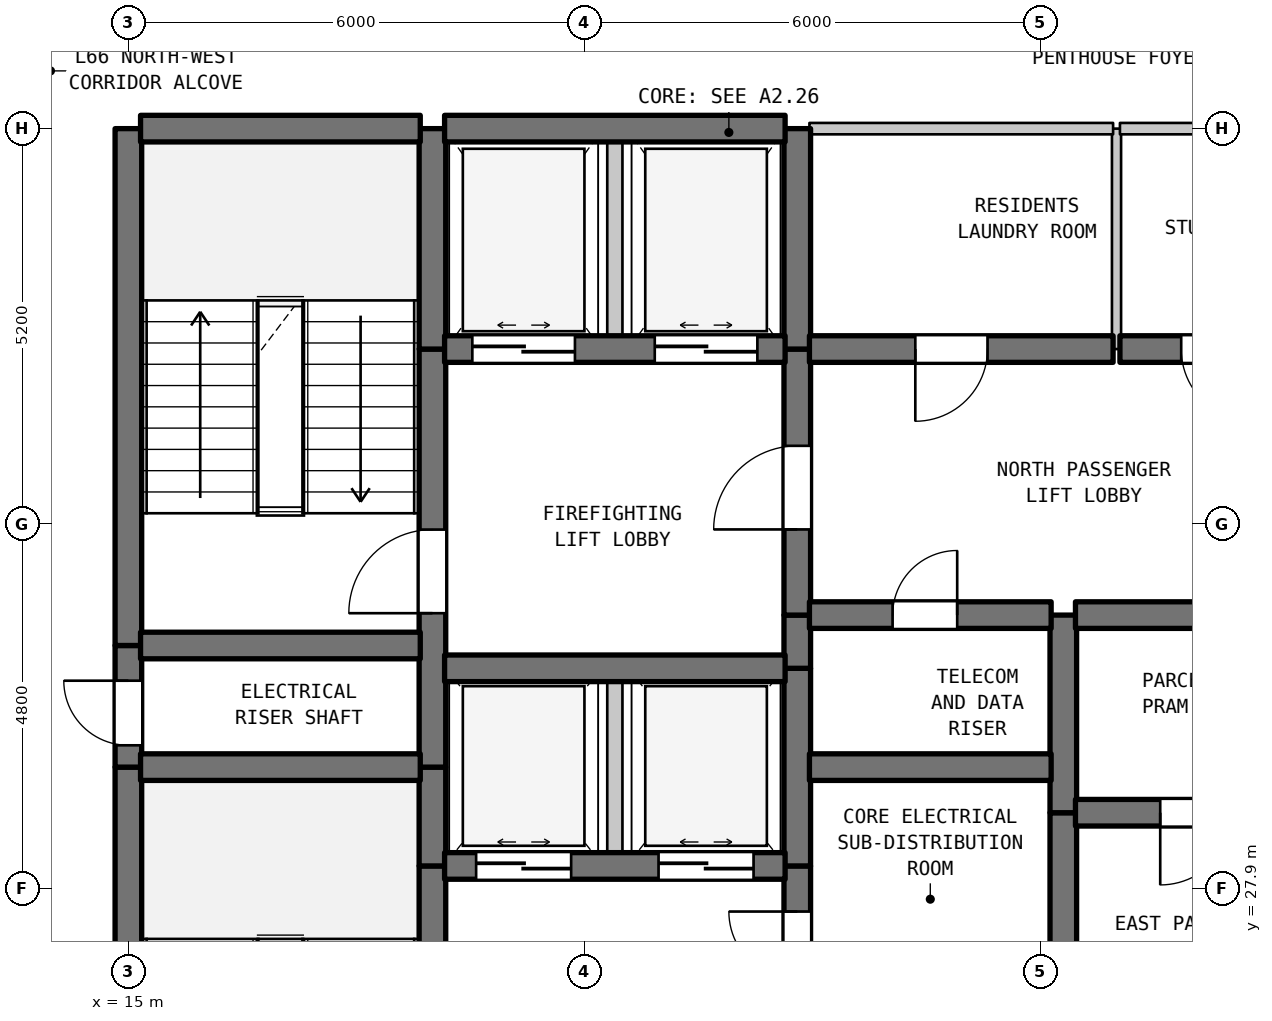
"""IFC4 building model, lengths in metres.
Left out: names, types, materials, properties, quantities, classifications, styles, units other than length and angle.
Written with IfcOpenShell. Run it as: python <this file> out.ifc"""

import sys

from ifc_helpers import new_model, si_unit, direction, frame, frame_2d, origin, place, context, subcontext, project, spatial, rectangle, extrude, element, fill, save


model = new_model("IFC4")
c1 = context("Model", 3, precision=1e-05, world=origin(), true_north=direction((0.0, 1.0)))
c2 = subcontext(c1, "Body", "Model", "MODEL_VIEW")
j1 = project(units=[si_unit("LENGTHUNIT", "METRE"), si_unit("PLANEANGLEUNIT", "RADIAN")], contexts=[c1])
p1 = place(None, origin())
s1 = spatial("IfcSite", under=j1, at=p1, CompositionType="ELEMENT")
p2 = place(p1, origin())
s2 = spatial("IfcBuilding", under=s1, at=p2, CompositionType="ELEMENT")
p3 = place(p2, frame((0.0, 0.0, 265.8)))
s3 = spatial("IfcBuildingStorey", under=s2, at=p3, CompositionType="ELEMENT", Elevation=265.8)
p4 = place(p3, frame((15.0, 22.7, 0.0), z_axis=(0.0, 0.0, 1.0), x_axis=(0.0, 1.0, 0.0)))
e1 = element("IfcWall", 1, at=p4, inside=s3, PredefinedType="SHEAR", context=c2, shape_type="SweptSolid", body=[
    extrude(rectangle(XDim=6.8, YDim=0.35, at=frame_2d((3.4, 0.0))), origin(), (0.0, 0.0, 1.0), 3.39),
])
p5 = place(p3, frame((15.0, 29.5, 0.0), z_axis=(0.0, 0.0, 1.0), x_axis=(0.0, 1.0, 0.0)))
e2 = element("IfcWall", 2, at=p5, inside=s3, PredefinedType="SHEAR", context=c2, shape_type="SweptSolid", body=[
    extrude(rectangle(XDim=1.6, YDim=0.35, at=frame_2d((0.8, 0.0))), origin(), (0.0, 0.0, 1.0), 3.39),
])
p6 = place(p5, frame((0.287, 0.0, 0.0)))
e3 = element("IfcOpeningElement", 3, at=p6, cuts=e2, PredefinedType="OPENING", context=c2, shape_type="SweptSolid", body=[
    extrude(rectangle(XDim=0.85, YDim=2.1, at=frame_2d((0.425, 1.05))), frame((0.0, 0.185, 0.0), z_axis=(0.0, -1.0, 0.0), x_axis=(1.0, 0.0, 0.0)), (0.0, 0.0, 1.0), 0.37),
])
p7 = place(p3, frame((15.0, 31.1, 0.0), z_axis=(0.0, 0.0, 1.0), x_axis=(0.0, 1.0, 0.0)))
e4 = element("IfcWall", 4, at=p7, inside=s3, PredefinedType="SHEAR", context=c2, shape_type="SweptSolid", body=[
    extrude(rectangle(XDim=6.8, YDim=0.35, at=frame_2d((3.4, 0.0))), origin(), (0.0, 0.0, 1.0), 3.39),
])
p8 = place(p3, frame((19.0, 22.7, 0.0), z_axis=(0.0, 0.0, 1.0), x_axis=(0.0, 1.0, 0.0)))
e5 = element("IfcWall", 5, at=p8, inside=s3, PredefinedType="SHEAR", context=c2, shape_type="SweptSolid", body=[
    extrude(rectangle(XDim=5.5, YDim=0.35, at=frame_2d((2.75, 0.0))), origin(), (0.0, 0.0, 1.0), 3.39),
])
p9 = place(p8, frame((0.631, 0.0, 0.0)))
e6 = element("IfcOpeningElement", 6, at=p9, cuts=e5, PredefinedType="OPENING", context=c2, shape_type="SweptSolid", body=[
    extrude(rectangle(XDim=1.1, YDim=2.15, at=frame_2d((0.55, 1.075))), frame((0.0, 0.185, 0.0), z_axis=(0.0, -1.0, 0.0), x_axis=(1.0, 0.0, 0.0)), (0.0, 0.0, 1.0), 0.37),
])
p10 = place(p3, frame((19.0, 28.2, 0.0), z_axis=(0.0, 0.0, 1.0), x_axis=(0.0, 1.0, 0.0)))
e7 = element("IfcWall", 7, at=p10, inside=s3, PredefinedType="SHEAR", context=c2, shape_type="SweptSolid", body=[
    extrude(rectangle(XDim=1.3, YDim=0.35, at=frame_2d((0.65, 0.0))), origin(), (0.0, 0.0, 1.0), 3.39),
])
p11 = place(p3, frame((19.0, 29.5, 0.0), z_axis=(0.0, 0.0, 1.0), x_axis=(0.0, 1.0, 0.0)))
e8 = element("IfcWall", 8, at=p11, inside=s3, PredefinedType="SHEAR", context=c2, shape_type="SweptSolid", body=[
    extrude(rectangle(XDim=5.5, YDim=0.35, at=frame_2d((2.75, 0.0))), origin(), (0.0, 0.0, 1.0), 3.39),
])
p12 = place(p11, frame((2.025, 0.0, 0.0)))
e9 = element("IfcOpeningElement", 9, at=p12, cuts=e8, PredefinedType="OPENING", context=c2, shape_type="SweptSolid", body=[
    extrude(rectangle(XDim=1.1, YDim=2.15, at=frame_2d((0.55, 1.075))), frame((0.0, 0.185, 0.0), z_axis=(0.0, -1.0, 0.0), x_axis=(1.0, 0.0, 0.0)), (0.0, 0.0, 1.0), 0.37),
])
p13 = place(p3, frame((19.0, 35.0, 0.0), z_axis=(0.0, 0.0, 1.0), x_axis=(0.0, 1.0, 0.0)))
e10 = element("IfcWall", 10, at=p13, inside=s3, PredefinedType="SHEAR", context=c2, shape_type="SweptSolid", body=[
    extrude(rectangle(XDim=2.9, YDim=0.35, at=frame_2d((1.45, 0.0))), origin(), (0.0, 0.0, 1.0), 3.39),
])
p14 = place(p3, frame((21.4, 28.2, 0.0), z_axis=(0.0, 0.0, 1.0), x_axis=(0.0, 1.0, 0.0)))
e11 = element("IfcWall", 11, at=p14, inside=s3, PredefinedType="STANDARD", context=c2, shape_type="SweptSolid", body=[
    extrude(rectangle(XDim=2.6, YDim=0.2, at=frame_2d((1.3, 0.0))), origin(), (0.0, 0.0, 1.0), 3.39),
])
p15 = place(p3, frame((21.4, 35.0, 0.0), z_axis=(0.0, 0.0, 1.0), x_axis=(0.0, 1.0, 0.0)))
e12 = element("IfcWall", 12, at=p15, inside=s3, PredefinedType="STANDARD", context=c2, shape_type="SweptSolid", body=[
    extrude(rectangle(XDim=2.9, YDim=0.2, at=frame_2d((1.45, 0.0))), origin(), (0.0, 0.0, 1.0), 3.39),
])
p16 = place(p3, frame((23.8, 26.1, 0.0), z_axis=(0.0, 0.0, 1.0), x_axis=(0.0, 1.0, 0.0)))
e13 = element("IfcWall", 13, at=p16, inside=s3, PredefinedType="SHEAR", context=c2, shape_type="SweptSolid", body=[
    extrude(rectangle(XDim=2.1, YDim=0.35, at=frame_2d((1.05, 0.0))), origin(), (0.0, 0.0, 1.0), 3.39),
])
p17 = place(p16, frame((0.6, 0.0, 0.0)))
e14 = element("IfcOpeningElement", 14, at=p17, cuts=e13, PredefinedType="OPENING", context=c2, shape_type="SweptSolid", body=[
    extrude(rectangle(XDim=0.9, YDim=2.15, at=frame_2d((0.45, 1.075))), frame((0.0, 0.185, 0.0), z_axis=(0.0, -1.0, 0.0), x_axis=(1.0, 0.0, 0.0)), (0.0, 0.0, 1.0), 0.37),
])
p18 = place(p3, frame((23.8, 28.2, 0.0), z_axis=(0.0, 0.0, 1.0), x_axis=(0.0, 1.0, 0.0)))
e15 = element("IfcWall", 15, at=p18, inside=s3, PredefinedType="SHEAR", context=c2, shape_type="SweptSolid", body=[
    extrude(rectangle(XDim=2.6, YDim=0.35, at=frame_2d((1.3, 0.0))), origin(), (0.0, 0.0, 1.0), 3.39),
])
p19 = place(p3, frame((23.8, 30.8, 0.0), z_axis=(0.0, 0.0, 1.0), x_axis=(0.0, 1.0, 0.0)))
e16 = element("IfcWall", 16, at=p19, inside=s3, PredefinedType="SHEAR", context=c2, shape_type="SweptSolid", body=[
    extrude(rectangle(XDim=0.7, YDim=0.35, at=frame_2d((0.35, 0.0))), origin(), (0.0, 0.0, 1.0), 3.39),
])
p20 = place(p3, frame((23.8, 31.5, 0.0), z_axis=(0.0, 0.0, 1.0), x_axis=(0.0, 1.0, 0.0)))
e17 = element("IfcWall", 17, at=p20, inside=s3, PredefinedType="SHEAR", context=c2, shape_type="SweptSolid", body=[
    extrude(rectangle(XDim=3.5, YDim=0.35, at=frame_2d((1.75, 0.0))), origin(), (0.0, 0.0, 1.0), 3.39),
])
p21 = place(p20, frame((1.127, 0.0, 0.0)))
e18 = element("IfcOpeningElement", 18, at=p21, cuts=e17, PredefinedType="OPENING", context=c2, shape_type="SweptSolid", body=[
    extrude(rectangle(XDim=1.1, YDim=2.15, at=frame_2d((0.55, 1.075))), frame((0.0, 0.185, 0.0), z_axis=(0.0, -1.0, 0.0), x_axis=(1.0, 0.0, 0.0)), (0.0, 0.0, 1.0), 0.37),
])
p22 = place(p3, frame((23.8, 35.0, 0.0), z_axis=(0.0, 0.0, 1.0), x_axis=(0.0, 1.0, 0.0)))
e19 = element("IfcWall", 19, at=p22, inside=s3, PredefinedType="SHEAR", context=c2, shape_type="SweptSolid", body=[
    extrude(rectangle(XDim=2.9, YDim=0.35, at=frame_2d((1.45, 0.0))), origin(), (0.0, 0.0, 1.0), 3.39),
])
p23 = place(p3, frame((27.3, 26.1, 0.0), z_axis=(0.0, 0.0, 1.0), x_axis=(0.0, 1.0, 0.0)))
e20 = element("IfcWall", 20, at=p23, inside=s3, PredefinedType="SHEAR", context=c2, shape_type="SweptSolid", body=[
    extrude(rectangle(XDim=2.8, YDim=0.35, at=frame_2d((1.4, 0.0))), origin(), (0.0, 0.0, 1.0), 3.39),
])
p24 = place(p3, frame((27.3, 28.9, 0.0), z_axis=(0.0, 0.0, 1.0), x_axis=(0.0, 1.0, 0.0)))
e21 = element("IfcWall", 21, at=p24, inside=s3, PredefinedType="SHEAR", context=c2, shape_type="SweptSolid", body=[
    extrude(rectangle(XDim=2.6, YDim=0.35, at=frame_2d((1.3, 0.0))), origin(), (0.0, 0.0, 1.0), 3.39),
])
p25 = place(p3, frame((28.0, 35.0, 0.0), z_axis=(0.0, 0.0, 1.0), x_axis=(0.0, 1.0, 0.0)))
e22 = element("IfcWall", 22, at=p25, inside=s3, PredefinedType="PARTITIONING", context=c2, shape_type="SweptSolid", body=[
    extrude(rectangle(XDim=2.9, YDim=0.12, at=frame_2d((1.45, 0.0))), origin(), (0.0, 0.0, 1.0), 3.39),
])
p26 = place(p3, frame((19.16, 28.2, 0.0), z_axis=(0.0, 0.0, 1.0), x_axis=(1.0, 0.0, 0.0)))
e23 = element("IfcWall", 23, at=p26, inside=s3, PredefinedType="SHEAR", context=c2, shape_type="SweptSolid", body=[
    extrude(rectangle(XDim=4.48, YDim=0.35, at=frame_2d((2.24, 0.0))), origin(), (0.0, 0.0, 1.0), 3.39),
])
p27 = place(p26, frame((0.415, 0.0, 0.0)))
e24 = element("IfcOpeningElement", 24, at=p27, cuts=e23, PredefinedType="OPENING", context=c2, shape_type="SweptSolid", body=[
    extrude(rectangle(XDim=1.25, YDim=2.2, at=frame_2d((0.625, 1.1))), frame((0.0, 0.185, 0.0), z_axis=(0.0, -1.0, 0.0), x_axis=(1.0, 0.0, 0.0)), (0.0, 0.0, 1.0), 0.37),
])
p28 = place(p26, frame((2.815, 0.0, 0.0)))
e25 = element("IfcOpeningElement", 25, at=p28, cuts=e23, PredefinedType="OPENING", context=c2, shape_type="SweptSolid", body=[
    extrude(rectangle(XDim=1.25, YDim=2.2, at=frame_2d((0.625, 1.1))), frame((0.0, 0.185, 0.0), z_axis=(0.0, -1.0, 0.0), x_axis=(1.0, 0.0, 0.0)), (0.0, 0.0, 1.0), 0.37),
])
p29 = place(p3, frame((27.46, 28.9, 0.0), z_axis=(0.0, 0.0, 1.0), x_axis=(1.0, 0.0, 0.0)))
e26 = element("IfcWall", 26, at=p29, inside=s3, PredefinedType="SHEAR", context=c2, shape_type="SweptSolid", body=[
    extrude(rectangle(XDim=3.18, YDim=0.35, at=frame_2d((1.59, 0.0))), origin(), (0.0, 0.0, 1.0), 3.39),
])
p30 = place(p29, frame((1.115, 0.0, 0.0)))
e27 = element("IfcOpeningElement", 27, at=p30, cuts=e26, PredefinedType="OPENING", context=c2, shape_type="SweptSolid", body=[
    extrude(rectangle(XDim=0.95, YDim=2.15, at=frame_2d((0.475, 1.075))), frame((0.0, 0.185, 0.0), z_axis=(0.0, -1.0, 0.0), x_axis=(1.0, 0.0, 0.0)), (0.0, 0.0, 1.0), 0.37),
])
p31 = place(p3, frame((15.16, 29.5, 0.0), z_axis=(0.0, 0.0, 1.0), x_axis=(1.0, 0.0, 0.0)))
e28 = element("IfcWall", 28, at=p31, inside=s3, PredefinedType="SHEAR", context=c2, shape_type="SweptSolid", body=[
    extrude(rectangle(XDim=3.68, YDim=0.35, at=frame_2d((1.84, 0.0))), origin(), (0.0, 0.0, 1.0), 3.39),
])
p32 = place(p3, frame((23.96, 29.5, 0.0), z_axis=(0.0, 0.0, 1.0), x_axis=(1.0, 0.0, 0.0)))
e29 = element("IfcWall", 29, at=p32, inside=s3, PredefinedType="SHEAR", context=c2, shape_type="SweptSolid", body=[
    extrude(rectangle(XDim=3.18, YDim=0.35, at=frame_2d((1.59, 0.0))), origin(), (0.0, 0.0, 1.0), 3.39),
])
p33 = place(p3, frame((19.16, 30.8, 0.0), z_axis=(0.0, 0.0, 1.0), x_axis=(1.0, 0.0, 0.0)))
e30 = element("IfcWall", 30, at=p33, inside=s3, PredefinedType="SHEAR", context=c2, shape_type="SweptSolid", body=[
    extrude(rectangle(XDim=4.48, YDim=0.35, at=frame_2d((2.24, 0.0))), origin(), (0.0, 0.0, 1.0), 3.39),
])
p34 = place(p3, frame((15.16, 31.1, 0.0), z_axis=(0.0, 0.0, 1.0), x_axis=(1.0, 0.0, 0.0)))
e31 = element("IfcWall", 31, at=p34, inside=s3, PredefinedType="SHEAR", context=c2, shape_type="SweptSolid", body=[
    extrude(rectangle(XDim=3.68, YDim=0.35, at=frame_2d((1.84, 0.0))), origin(), (0.0, 0.0, 1.0), 3.39),
])
p35 = place(p3, frame((23.96, 31.5, 0.0), z_axis=(0.0, 0.0, 1.0), x_axis=(1.0, 0.0, 0.0)))
e32 = element("IfcWall", 32, at=p35, inside=s3, PredefinedType="SHEAR", context=c2, shape_type="SweptSolid", body=[
    extrude(rectangle(XDim=3.18, YDim=0.35, at=frame_2d((1.59, 0.0))), origin(), (0.0, 0.0, 1.0), 3.39),
])
p36 = place(p35, frame((1.094, 0.0, 0.0)))
e33 = element("IfcOpeningElement", 33, at=p36, cuts=e32, PredefinedType="OPENING", context=c2, shape_type="SweptSolid", body=[
    extrude(rectangle(XDim=0.85, YDim=2.1, at=frame_2d((0.425, 1.05))), frame((0.0, 0.185, 0.0), z_axis=(0.0, -1.0, 0.0), x_axis=(1.0, 0.0, 0.0)), (0.0, 0.0, 1.0), 0.37),
])
p37 = place(p3, frame((27.46, 31.5, 0.0), z_axis=(0.0, 0.0, 1.0), x_axis=(1.0, 0.0, 0.0)))
e34 = element("IfcWall", 34, at=p37, inside=s3, PredefinedType="SHEAR", context=c2, shape_type="SweptSolid", body=[
    extrude(rectangle(XDim=3.18, YDim=0.35, at=frame_2d((1.59, 0.0))), origin(), (0.0, 0.0, 1.0), 3.39),
])
p38 = place(p3, frame((19.16, 35.0, 0.0), z_axis=(0.0, 0.0, 1.0), x_axis=(1.0, 0.0, 0.0)))
e35 = element("IfcWall", 35, at=p38, inside=s3, PredefinedType="SHEAR", context=c2, shape_type="SweptSolid", body=[
    extrude(rectangle(XDim=4.48, YDim=0.35, at=frame_2d((2.24, 0.0))), origin(), (0.0, 0.0, 1.0), 3.39),
])
p39 = place(p38, frame((0.365, 0.0, 0.0)))
e36 = element("IfcOpeningElement", 36, at=p39, cuts=e35, PredefinedType="OPENING", context=c2, shape_type="SweptSolid", body=[
    extrude(rectangle(XDim=1.35, YDim=2.2, at=frame_2d((0.675, 1.1))), frame((0.0, 0.185, 0.0), z_axis=(0.0, -1.0, 0.0), x_axis=(1.0, 0.0, 0.0)), (0.0, 0.0, 1.0), 0.37),
])
p40 = place(p38, frame((2.765, 0.0, 0.0)))
e37 = element("IfcOpeningElement", 37, at=p40, cuts=e35, PredefinedType="OPENING", context=c2, shape_type="SweptSolid", body=[
    extrude(rectangle(XDim=1.35, YDim=2.2, at=frame_2d((0.675, 1.1))), frame((0.0, 0.185, 0.0), z_axis=(0.0, -1.0, 0.0), x_axis=(1.0, 0.0, 0.0)), (0.0, 0.0, 1.0), 0.37),
])
p41 = place(p3, frame((23.96, 35.0, 0.0), z_axis=(0.0, 0.0, 1.0), x_axis=(1.0, 0.0, 0.0)))
e38 = element("IfcWall", 38, at=p41, inside=s3, PredefinedType="SHEAR", context=c2, shape_type="SweptSolid", body=[
    extrude(rectangle(XDim=3.995, YDim=0.35, at=frame_2d((1.998, 0.0))), origin(), (0.0, 0.0, 1.0), 3.39),
])
p42 = place(p41, frame((1.393, 0.0, 0.0)))
e39 = element("IfcOpeningElement", 39, at=p42, cuts=e38, PredefinedType="OPENING", context=c2, shape_type="SweptSolid", body=[
    extrude(rectangle(XDim=0.95, YDim=2.15, at=frame_2d((0.475, 1.075))), frame((0.0, 0.185, 0.0), z_axis=(0.0, -1.0, 0.0), x_axis=(1.0, 0.0, 0.0)), (0.0, 0.0, 1.0), 0.37),
])
p43 = place(p3, frame((28.045, 35.0, 0.0), z_axis=(0.0, 0.0, 1.0), x_axis=(1.0, 0.0, 0.0)))
e40 = element("IfcWall", 40, at=p43, inside=s3, PredefinedType="SHEAR", context=c2, shape_type="SweptSolid", body=[
    extrude(rectangle(XDim=2.595, YDim=0.35, at=frame_2d((1.297, 0.0))), origin(), (0.0, 0.0, 1.0), 3.39),
])
p44 = place(p43, frame((0.806, 0.0, 0.0)))
e41 = element("IfcOpeningElement", 41, at=p44, cuts=e40, PredefinedType="OPENING", context=c2, shape_type="SweptSolid", body=[
    extrude(rectangle(XDim=0.95, YDim=2.15, at=frame_2d((0.475, 1.075))), frame((0.0, 0.185, 0.0), z_axis=(0.0, -1.0, 0.0), x_axis=(1.0, 0.0, 0.0)), (0.0, 0.0, 1.0), 0.37),
])
p45 = place(p3, frame((15.16, 37.9, 0.0), z_axis=(0.0, 0.0, 1.0), x_axis=(1.0, 0.0, 0.0)))
e42 = element("IfcWall", 42, at=p45, inside=s3, PredefinedType="SHEAR", context=c2, shape_type="SweptSolid", body=[
    extrude(rectangle(XDim=3.68, YDim=0.35, at=frame_2d((1.84, 0.0))), origin(), (0.0, 0.0, 1.0), 3.39),
])
p46 = place(p3, frame((19.16, 37.9, 0.0), z_axis=(0.0, 0.0, 1.0), x_axis=(1.0, 0.0, 0.0)))
e43 = element("IfcWall", 43, at=p46, inside=s3, PredefinedType="SHEAR", context=c2, shape_type="SweptSolid", body=[
    extrude(rectangle(XDim=4.48, YDim=0.35, at=frame_2d((2.24, 0.0))), origin(), (0.0, 0.0, 1.0), 3.39),
])
p47 = place(p3, frame((23.96, 37.9, 0.0), z_axis=(0.0, 0.0, 1.0), x_axis=(1.0, 0.0, 0.0)))
e44 = element("IfcWall", 44, at=p47, inside=s3, PredefinedType="STANDARD", context=c2, shape_type="SweptSolid", body=[
    extrude(rectangle(XDim=3.995, YDim=0.15, at=frame_2d((1.998, 0.0))), origin(), (0.0, 0.0, 1.0), 2.89),
])
p48 = place(p3, frame((28.045, 37.9, 0.0), z_axis=(0.0, 0.0, 1.0), x_axis=(1.0, 0.0, 0.0)))
e45 = element("IfcWall", 45, at=p48, inside=s3, PredefinedType="STANDARD", context=c2, shape_type="SweptSolid", body=[
    extrude(rectangle(XDim=2.695, YDim=0.15, at=frame_2d((1.348, 0.0))), origin(), (0.0, 0.0, 1.0), 2.89),
])
p49 = place(p6, origin())
e46 = element("IfcDoor", 46, at=p49, inside=s3, OperationType="SINGLE_SWING_RIGHT", PredefinedType="DOOR", context=c2, shape_type="SweptSolid", body=[
    extrude(rectangle(XDim=0.85, YDim=2.1, at=frame_2d((0.425, 1.05))), frame((0.0, 0.025, 0.0), z_axis=(0.0, -1.0, 0.0), x_axis=(1.0, 0.0, 0.0)), (0.0, 0.0, 1.0), 0.05),
])
fill(e3, e46)
p50 = place(p12, origin())
e47 = element("IfcDoor", 47, at=p50, inside=s3, OperationType="SINGLE_SWING_LEFT", PredefinedType="DOOR", context=c2, shape_type="SweptSolid", body=[
    extrude(rectangle(XDim=1.1, YDim=2.15, at=frame_2d((0.55, 1.075))), frame((0.0, 0.025, 0.0), z_axis=(0.0, -1.0, 0.0), x_axis=(1.0, 0.0, 0.0)), (0.0, 0.0, 1.0), 0.05),
])
fill(e9, e47)
p51 = place(p17, origin())
e48 = element("IfcDoor", 48, at=p51, inside=s3, OperationType="SINGLE_SWING_RIGHT", PredefinedType="DOOR", context=c2, shape_type="SweptSolid", body=[
    extrude(rectangle(XDim=0.9, YDim=2.15, at=frame_2d((0.45, 1.075))), frame((0.0, 0.025, 0.0), z_axis=(0.0, -1.0, 0.0), x_axis=(1.0, 0.0, 0.0)), (0.0, 0.0, 1.0), 0.05),
])
fill(e14, e48)
p52 = place(p21, origin())
e49 = element("IfcDoor", 49, at=p52, inside=s3, OperationType="SINGLE_SWING_LEFT", PredefinedType="DOOR", context=c2, shape_type="SweptSolid", body=[
    extrude(rectangle(XDim=1.1, YDim=2.15, at=frame_2d((0.55, 1.075))), frame((0.0, 0.025, 0.0), z_axis=(0.0, -1.0, 0.0), x_axis=(1.0, 0.0, 0.0)), (0.0, 0.0, 1.0), 0.05),
])
fill(e18, e49)
p53 = place(p27, origin())
e50 = element("IfcDoor", 50, at=p53, inside=s3, OperationType="DOUBLE_DOOR_SLIDING", PredefinedType="DOOR", context=c2, shape_type="SweptSolid", body=[
    extrude(rectangle(XDim=1.25, YDim=2.2, at=frame_2d((0.625, 1.1))), frame((0.0, 0.025, 0.0), z_axis=(0.0, -1.0, 0.0), x_axis=(1.0, 0.0, 0.0)), (0.0, 0.0, 1.0), 0.05),
])
fill(e24, e50)
p54 = place(p28, origin())
e51 = element("IfcDoor", 51, at=p54, inside=s3, OperationType="DOUBLE_DOOR_SLIDING", PredefinedType="DOOR", context=c2, shape_type="SweptSolid", body=[
    extrude(rectangle(XDim=1.25, YDim=2.2, at=frame_2d((0.625, 1.1))), frame((0.0, 0.025, 0.0), z_axis=(0.0, -1.0, 0.0), x_axis=(1.0, 0.0, 0.0)), (0.0, 0.0, 1.0), 0.05),
])
fill(e25, e51)
p55 = place(p30, frame((0.95, 0.0, 0.0), z_axis=(0.0, 0.0, 1.0), x_axis=(-1.0, 0.0, 0.0)))
e52 = element("IfcDoor", 52, at=p55, inside=s3, OperationType="SINGLE_SWING_LEFT", PredefinedType="DOOR", context=c2, shape_type="SweptSolid", body=[
    extrude(rectangle(XDim=0.95, YDim=2.15, at=frame_2d((0.475, 1.075))), frame((0.0, 0.025, 0.0), z_axis=(0.0, -1.0, 0.0), x_axis=(1.0, 0.0, 0.0)), (0.0, 0.0, 1.0), 0.05),
])
fill(e27, e52)
p56 = place(p36, origin())
e53 = element("IfcDoor", 53, at=p56, inside=s3, OperationType="SINGLE_SWING_RIGHT", PredefinedType="DOOR", context=c2, shape_type="SweptSolid", body=[
    extrude(rectangle(XDim=0.85, YDim=2.1, at=frame_2d((0.425, 1.05))), frame((0.0, 0.025, 0.0), z_axis=(0.0, -1.0, 0.0), x_axis=(1.0, 0.0, 0.0)), (0.0, 0.0, 1.0), 0.05),
])
fill(e33, e53)
p57 = place(p39, origin())
e54 = element("IfcDoor", 54, at=p57, inside=s3, OperationType="DOUBLE_DOOR_SLIDING", PredefinedType="DOOR", context=c2, shape_type="SweptSolid", body=[
    extrude(rectangle(XDim=1.35, YDim=2.2, at=frame_2d((0.675, 1.1))), frame((0.0, 0.025, 0.0), z_axis=(0.0, -1.0, 0.0), x_axis=(1.0, 0.0, 0.0)), (0.0, 0.0, 1.0), 0.05),
])
fill(e36, e54)
p58 = place(p40, origin())
e55 = element("IfcDoor", 55, at=p58, inside=s3, OperationType="DOUBLE_DOOR_SLIDING", PredefinedType="DOOR", context=c2, shape_type="SweptSolid", body=[
    extrude(rectangle(XDim=1.35, YDim=2.2, at=frame_2d((0.675, 1.1))), frame((0.0, 0.025, 0.0), z_axis=(0.0, -1.0, 0.0), x_axis=(1.0, 0.0, 0.0)), (0.0, 0.0, 1.0), 0.05),
])
fill(e37, e55)
p59 = place(p42, frame((0.95, 0.0, 0.0), z_axis=(0.0, 0.0, 1.0), x_axis=(-1.0, 0.0, 0.0)))
e56 = element("IfcDoor", 56, at=p59, inside=s3, OperationType="SINGLE_SWING_LEFT", PredefinedType="DOOR", context=c2, shape_type="SweptSolid", body=[
    extrude(rectangle(XDim=0.95, YDim=2.15, at=frame_2d((0.475, 1.075))), frame((0.0, 0.025, 0.0), z_axis=(0.0, -1.0, 0.0), x_axis=(1.0, 0.0, 0.0)), (0.0, 0.0, 1.0), 0.05),
])
fill(e39, e56)
p60 = place(p44, frame((0.95, 0.0, 0.0), z_axis=(0.0, 0.0, 1.0), x_axis=(-1.0, 0.0, 0.0)))
e57 = element("IfcDoor", 57, at=p60, inside=s3, OperationType="SINGLE_SWING_RIGHT", PredefinedType="DOOR", context=c2, shape_type="SweptSolid", body=[
    extrude(rectangle(XDim=0.95, YDim=2.15, at=frame_2d((0.475, 1.075))), frame((0.0, 0.025, 0.0), z_axis=(0.0, -1.0, 0.0), x_axis=(1.0, 0.0, 0.0)), (0.0, 0.0, 1.0), 0.05),
])
fill(e41, e57)
save(model, sys.argv[1])
